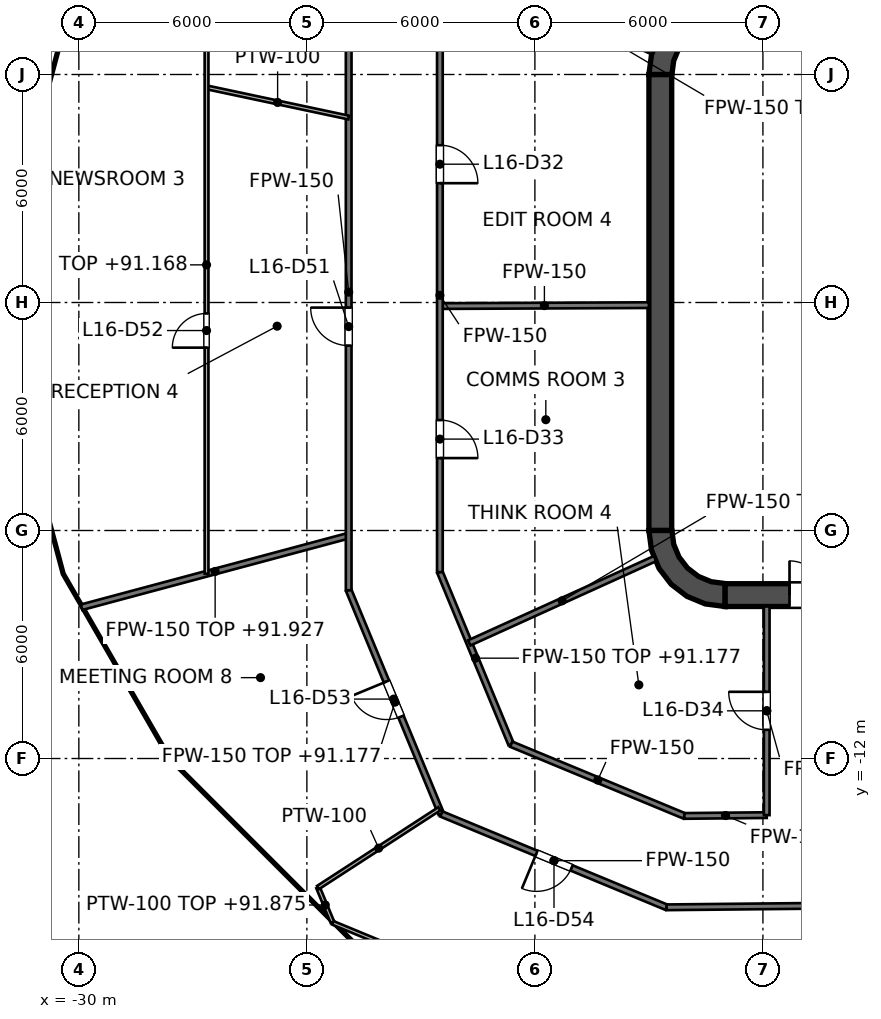
"""IFC4 building model, lengths in metres.
Left out: names, types, materials, properties, quantities, classifications, styles, units other than length and angle.
Written with IfcOpenShell. Run it as: python <this file> out.ifc"""

import sys

from ifc_helpers import new_model, si_unit, direction, frame, frame_2d, origin, place, context, subcontext, project, spatial, polyline, rectangle, outline, extrude, element, fill, save


model = new_model("IFC4")
c1 = context("Model", 3, precision=1e-05, world=origin(), true_north=direction((0.0, 1.0)))
c2 = subcontext(c1, "Body", "Model", "MODEL_VIEW")
j1 = project(units=[si_unit("LENGTHUNIT", "METRE"), si_unit("PLANEANGLEUNIT", "RADIAN")], contexts=[c1])
p1 = place(None, origin())
s1 = spatial("IfcSite", under=j1, at=p1, CompositionType="ELEMENT")
p2 = place(p1, origin())
s2 = spatial("IfcBuilding", under=s1, at=p2, CompositionType="ELEMENT")
p3 = place(p2, frame((0.0, 0.0, 88.2)))
s3 = spatial("IfcBuildingStorey", under=s2, at=p3, CompositionType="ELEMENT", Elevation=88.2)
p4 = place(p3, frame((-13.0, -7.7, 0.0), z_axis=(0.0, 0.0, 1.0), x_axis=(1.0, 0.0, 0.0)))
e1 = element("IfcWall", 1, at=p4, inside=s3, PredefinedType="SHEAR", context=c2, shape_type="SweptSolid", body=[
    extrude(rectangle(XDim=26.0, YDim=0.6, at=frame_2d((13.0, 0.0))), origin(), (0.0, 0.0, 1.0), 4.2),
])
p5 = place(p4, frame((1.7, 0.0, 0.0)))
e2 = element("IfcOpeningElement", 2, at=p5, cuts=e1, PredefinedType="OPENING", context=c2, shape_type="SweptSolid", body=[
    extrude(rectangle(XDim=1.8, YDim=2.1, at=frame_2d((0.9, 1.05))), frame((0.0, 0.3, 0.0), z_axis=(0.0, -1.0, 0.0), x_axis=(1.0, 0.0, 0.0)), (0.0, 0.0, 1.0), 0.6),
])
p6 = place(p4, frame((22.5, 0.0, 0.0)))
e3 = element("IfcOpeningElement", 3, at=p6, cuts=e1, PredefinedType="OPENING", context=c2, shape_type="SweptSolid", body=[
    extrude(rectangle(XDim=1.8, YDim=2.1, at=frame_2d((0.9, 1.05))), frame((0.0, 0.3, 0.0), z_axis=(0.0, -1.0, 0.0), x_axis=(1.0, 0.0, 0.0)), (0.0, 0.0, 1.0), 0.6),
])
p7 = place(p3, frame((-14.7, -6.0, 0.0), z_axis=(0.0, 0.0, 1.0), x_axis=(0.0, 1.0, 0.0)))
e4 = element("IfcWall", 4, at=p7, inside=s3, PredefinedType="SHEAR", context=c2, shape_type="SweptSolid", body=[
    extrude(rectangle(XDim=12.0, YDim=0.6, at=frame_2d((6.0, 0.0))), origin(), (0.0, 0.0, 1.0), 4.2),
])
p8 = place(p3, origin())
e5 = element("IfcWall", 5, at=p8, inside=s3, PredefinedType="SHEAR", context=c2, shape_type="SweptSolid", body=[
    extrude(outline(polyline([(-15.0, 6.0), (-14.395, 6.0), (-14.347, 6.361), (-14.208, 6.698), (-13.986, 6.986), (-13.698, 7.208), (-13.361, 7.347), (-13.0, 7.395), (-13.0, 8.0), (-13.518, 7.932), (-14.0, 7.732), (-14.414, 7.414), (-14.732, 7.0), (-14.932, 6.518), (-15.0, 6.0)])), origin(), (0.0, 0.0, 1.0), 4.2),
])
e6 = element("IfcWall", 6, at=p8, inside=s3, PredefinedType="SHEAR", context=c2, shape_type="SweptSolid", body=[
    extrude(outline(polyline([(-13.0, -8.0), (-13.0, -7.395), (-13.361, -7.347), (-13.698, -7.208), (-13.986, -6.986), (-14.208, -6.698), (-14.347, -6.361), (-14.395, -6.0), (-15.0, -6.0), (-14.932, -6.518), (-14.732, -7.0), (-14.414, -7.414), (-14.0, -7.732), (-13.518, -7.932), (-13.0, -8.0)])), origin(), (0.0, 0.0, 1.0), 4.2),
])
p9 = place(p3, frame((-11.8, -7.4, 0.0), z_axis=(0.0, 0.0, 1.0), x_axis=(0.0, 1.0, 0.0)))
e7 = element("IfcWall", 7, at=p9, inside=s3, PredefinedType="SOLIDWALL", context=c2, shape_type="SweptSolid", body=[
    extrude(rectangle(XDim=14.8, YDim=0.4, at=frame_2d((7.4, 0.0))), origin(), (0.0, 0.0, 1.0), 4.05),
])
p10 = place(p9, frame((11.2, 0.0, 0.0)))
e8 = element("IfcOpeningElement", 8, at=p10, cuts=e7, PredefinedType="OPENING", context=c2, shape_type="SweptSolid", body=[
    extrude(rectangle(XDim=1.1, YDim=2.1, at=frame_2d((0.55, 1.05))), frame((0.0, 0.2, 0.0), z_axis=(0.0, -1.0, 0.0), x_axis=(1.0, 0.0, 0.0)), (0.0, 0.0, 1.0), 0.4),
])
p11 = place(p9, frame((8.3, 0.0, 0.0)))
e9 = element("IfcOpeningElement", 9, at=p11, cuts=e7, PredefinedType="OPENING", context=c2, shape_type="SweptSolid", body=[
    extrude(rectangle(XDim=1.1, YDim=2.1, at=frame_2d((0.55, 1.05))), frame((0.0, 0.2, 0.0), z_axis=(0.0, -1.0, 0.0), x_axis=(1.0, 0.0, 0.0)), (0.0, 0.0, 1.0), 0.4),
])
p12 = place(p9, frame((5.4, 0.0, 0.0)))
e10 = element("IfcOpeningElement", 10, at=p12, cuts=e7, PredefinedType="OPENING", context=c2, shape_type="SweptSolid", body=[
    extrude(rectangle(XDim=1.1, YDim=2.1, at=frame_2d((0.55, 1.05))), frame((0.0, 0.2, 0.0), z_axis=(0.0, -1.0, 0.0), x_axis=(1.0, 0.0, 0.0)), (0.0, 0.0, 1.0), 0.4),
])
p13 = place(p9, frame((13.552, 0.0, 0.0)))
e11 = element("IfcOpeningElement", 11, at=p13, cuts=e7, PredefinedType="OPENING", context=c2, shape_type="SweptSolid", body=[
    extrude(rectangle(XDim=0.9, YDim=2.1, at=frame_2d((0.45, 1.05))), frame((0.0, 0.2, 0.0), z_axis=(0.0, -1.0, 0.0), x_axis=(1.0, 0.0, 0.0)), (0.0, 0.0, 1.0), 0.4),
])
p14 = place(p9, frame((0.347, 0.0, 0.0)))
e12 = element("IfcOpeningElement", 12, at=p14, cuts=e7, PredefinedType="OPENING", context=c2, shape_type="SweptSolid", body=[
    extrude(rectangle(XDim=0.9, YDim=2.1, at=frame_2d((0.45, 1.05))), frame((0.0, 0.2, 0.0), z_axis=(0.0, -1.0, 0.0), x_axis=(1.0, 0.0, 0.0)), (0.0, 0.0, 1.0), 0.4),
])
e13 = element("IfcWall", 13, at=p8, inside=s3, PredefinedType="SOLIDWALL", context=c2, shape_type="SweptSolid", body=[
    extrude(outline(polyline([(-12.0, -5.925), (-12.0, -5.675), (-14.15, -5.675), (-14.15, -3.025), (-12.0, -3.025), (-12.0, -2.775), (-14.15, -2.775), (-14.15, -0.125), (-12.0, -0.125), (-12.0, 0.125), (-14.15, 0.125), (-14.15, 2.775), (-12.0, 2.775), (-12.0, 3.025), (-14.15, 3.025), (-14.15, 5.675), (-12.0, 5.675), (-12.0, 5.925), (-14.15, 5.925), (-14.4, 5.925), (-14.4, 5.675), (-14.4, 3.025), (-14.4, 2.775), (-14.4, 0.125), (-14.4, -0.125), (-14.4, -2.775), (-14.4, -3.025), (-14.4, -5.675), (-14.4, -5.925), (-14.15, -5.925), (-12.0, -5.925)])), origin(), (0.0, 0.0, 1.0), 4.05),
])
p15 = place(p3, frame((-22.9, -7.572, 0.0), z_axis=(0.0, 0.0, 1.0), x_axis=(0.382367581622, -0.924010298928, 0.0)))
e14 = element("IfcWall", 14, at=p15, inside=s3, PredefinedType="PARTITIONING", context=c2, shape_type="SweptSolid", body=[
    extrude(rectangle(XDim=6.374, YDim=0.15, at=frame_2d((3.187, 0.0))), origin(), (0.0, 0.0, 1.0), 2.977),
])
p16 = place(p15, frame((2.6, 0.0, 0.0)))
e15 = element("IfcOpeningElement", 15, at=p16, cuts=e14, PredefinedType="OPENING", context=c2, shape_type="SweptSolid", body=[
    extrude(rectangle(XDim=1.0, YDim=2.1, at=frame_2d((0.5, 1.05))), frame((0.0, 0.075, 0.0), z_axis=(0.0, -1.0, 0.0), x_axis=(1.0, 0.0, 0.0)), (0.0, 0.0, 1.0), 0.15),
])
p17 = place(p3, frame((-20.5, -7.095, 0.0), z_axis=(0.0, 0.0, 1.0), x_axis=(0.382364990163, -0.924011371303, 0.0)))
e16 = element("IfcWall", 16, at=p17, inside=s3, PredefinedType="PARTITIONING", context=c2, shape_type="SweptSolid", body=[
    extrude(rectangle(XDim=4.902, YDim=0.15, at=frame_2d((2.451, 0.0))), origin(), (0.0, 0.0, 1.0), 2.977),
])
p18 = place(p3, frame((-19.76, 8.755, 0.0), z_axis=(0.0, 0.0, 1.0), x_axis=(0.91424834547, -0.405154245695, 0.0)))
e17 = element("IfcWall", 17, at=p18, inside=s3, PredefinedType="PARTITIONING", context=c2, shape_type="SweptSolid", body=[
    extrude(rectangle(XDim=5.318, YDim=0.15, at=frame_2d((2.659, 0.0))), origin(), (0.0, 0.0, 1.0), 2.977),
])
p19 = place(p3, frame((-20.46, -13.46, 0.0), z_axis=(0.0, 0.0, 1.0), x_axis=(0.923801547606, -0.382871650349, 0.0)))
e18 = element("IfcWall", 18, at=p19, inside=s3, PredefinedType="PARTITIONING", context=c2, shape_type="SweptSolid", body=[
    extrude(rectangle(XDim=6.415, YDim=0.15, at=frame_2d((3.208, 0.0))), origin(), (0.0, 0.0, 1.0), 2.968),
])
p20 = place(p19, frame((2.707, 0.0, 0.0)))
e19 = element("IfcOpeningElement", 19, at=p20, cuts=e18, PredefinedType="OPENING", context=c2, shape_type="SweptSolid", body=[
    extrude(rectangle(XDim=1.0, YDim=2.1, at=frame_2d((0.5, 1.05))), frame((0.0, 0.075, 0.0), z_axis=(0.0, -1.0, 0.0), x_axis=(1.0, 0.0, 0.0)), (0.0, 0.0, 1.0), 0.15),
])
p21 = place(p3, frame((-18.623, -11.623, 0.0), z_axis=(0.0, 0.0, 1.0), x_axis=(0.923791670587, -0.38289548098, 0.0)))
e20 = element("IfcWall", 20, at=p21, inside=s3, PredefinedType="PARTITIONING", context=c2, shape_type="SweptSolid", body=[
    extrude(rectangle(XDim=4.931, YDim=0.15, at=frame_2d((2.465, 0.0))), origin(), (0.0, 0.0, 1.0), 2.968),
])
p22 = place(p3, frame((-20.5, -0.094, 0.0), z_axis=(0.0, 0.0, 1.0), x_axis=(0.999990148138, 0.004438876723, 0.0)))
e21 = element("IfcWall", 21, at=p22, inside=s3, PredefinedType="PARTITIONING", context=c2, shape_type="SweptSolid", body=[
    extrude(rectangle(XDim=5.5, YDim=0.15, at=frame_2d((2.75, 0.0))), origin(), (0.0, 0.0, 1.0), 2.968),
])
p23 = place(p3, frame((-14.534, -15.916, 0.0), z_axis=(0.0, 0.0, 1.0), x_axis=(0.999950930262, 0.009906415532, 0.0)))
e22 = element("IfcWall", 22, at=p23, inside=s3, PredefinedType="PARTITIONING", context=c2, shape_type="SweptSolid", body=[
    extrude(rectangle(XDim=33.123, YDim=0.15, at=frame_2d((16.561, 0.0))), origin(), (0.0, 0.0, 1.0), 2.968),
])
p24 = place(p23, frame((22.477, 0.0, 0.0)))
e23 = element("IfcOpeningElement", 23, at=p24, cuts=e22, PredefinedType="OPENING", context=c2, shape_type="SweptSolid", body=[
    extrude(rectangle(XDim=1.0, YDim=2.1, at=frame_2d((0.5, 1.05))), frame((0.0, 0.075, 0.0), z_axis=(0.0, -1.0, 0.0), x_axis=(1.0, 0.0, 0.0)), (0.0, 0.0, 1.0), 0.15),
])
p25 = place(p23, frame((7.723, 0.0, 0.0)))
e24 = element("IfcOpeningElement", 24, at=p25, cuts=e22, PredefinedType="OPENING", context=c2, shape_type="SweptSolid", body=[
    extrude(rectangle(XDim=1.0, YDim=2.1, at=frame_2d((0.5, 1.05))), frame((0.0, 0.075, 0.0), z_axis=(0.0, -1.0, 0.0), x_axis=(1.0, 0.0, 0.0)), (0.0, 0.0, 1.0), 0.15),
])
p26 = place(p23, frame((16.111, 0.0, 0.0)))
e25 = element("IfcOpeningElement", 25, at=p26, cuts=e22, PredefinedType="OPENING", context=c2, shape_type="SweptSolid", body=[
    extrude(rectangle(XDim=1.0, YDim=2.1, at=frame_2d((0.5, 1.05))), frame((0.0, 0.075, 0.0), z_axis=(0.0, -1.0, 0.0), x_axis=(1.0, 0.0, 0.0)), (0.0, 0.0, 1.0), 0.15),
])
p27 = place(p3, frame((-14.068, -13.511, 0.0), z_axis=(0.0, 0.0, 1.0), x_axis=(0.999950911515, 0.009908307647, 0.0)))
e26 = element("IfcWall", 26, at=p27, inside=s3, PredefinedType="PARTITIONING", context=c2, shape_type="SweptSolid", body=[
    extrude(rectangle(XDim=2.168, YDim=0.15, at=frame_2d((1.084, 0.0))), origin(), (0.0, 0.0, 1.0), 2.968),
])
p28 = place(p3, frame((-29.928, -8.019, 0.0), z_axis=(0.0, 0.0, 1.0), x_axis=(0.965929629594, 0.258804850559, 0.0)))
e27 = element("IfcWall", 27, at=p28, inside=s3, PredefinedType="PARTITIONING", context=c2, shape_type="SweptSolid", body=[
    extrude(rectangle(XDim=7.276, YDim=0.15, at=frame_2d((3.638, 0.0))), origin(), (0.0, 0.0, 1.0), 3.727),
])
p29 = place(p3, frame((-19.728, -8.958, 0.0), z_axis=(0.0, 0.0, 1.0), x_axis=(0.910629511797, 0.413223779863, 0.0)))
e28 = element("IfcWall", 28, at=p29, inside=s3, PredefinedType="PARTITIONING", context=c2, shape_type="SweptSolid", body=[
    extrude(rectangle(XDim=5.368, YDim=0.15, at=frame_2d((2.684, 0.0))), origin(), (0.0, 0.0, 1.0), 3.9),
])
p30 = place(p3, frame((-12.629, -21.874, 0.0), z_axis=(0.0, 0.0, 1.0), x_axis=(0.499986326517, 0.86603329803, 0.0)))
e29 = element("IfcWall", 29, at=p30, inside=s3, PredefinedType="PARTITIONING", context=c2, shape_type="SweptSolid", body=[
    extrude(rectangle(XDim=6.941, YDim=0.15, at=frame_2d((3.471, 0.0))), origin(), (0.0, 0.0, 1.0), 3.502),
])
p31 = place(p3, frame((-11.9, -13.49, 0.0), z_axis=(0.0, 0.0, 1.0), x_axis=(0.0, 1.0, 0.0)))
e30 = element("IfcWall", 30, at=p31, inside=s3, PredefinedType="PARTITIONING", context=c2, shape_type="SweptSolid", body=[
    extrude(rectangle(XDim=5.49, YDim=0.15, at=frame_2d((2.745, 0.0))), origin(), (0.0, 0.0, 1.0), 2.968),
])
p32 = place(p31, frame((2.245, 0.0, 0.0)))
e31 = element("IfcOpeningElement", 31, at=p32, cuts=e30, PredefinedType="OPENING", context=c2, shape_type="SweptSolid", body=[
    extrude(rectangle(XDim=1.0, YDim=2.1, at=frame_2d((0.5, 1.05))), frame((0.0, 0.075, 0.0), z_axis=(0.0, -1.0, 0.0), x_axis=(1.0, 0.0, 0.0)), (0.0, 0.0, 1.0), 0.15),
])
p33 = place(p3, frame((-20.5, -7.095, 0.0), z_axis=(0.0, 0.0, 1.0), x_axis=(0.0, 1.0, 0.0)))
e32 = element("IfcWall", 32, at=p33, inside=s3, PredefinedType="PARTITIONING", context=c2, shape_type="SweptSolid", body=[
    extrude(rectangle(XDim=14.569, YDim=0.15, at=frame_2d((7.285, 0.0))), origin(), (0.0, 0.0, 1.0), 2.968),
])
p34 = place(p33, frame((10.234, 0.0, 0.0)))
e33 = element("IfcOpeningElement", 33, at=p34, cuts=e32, PredefinedType="OPENING", context=c2, shape_type="SweptSolid", body=[
    extrude(rectangle(XDim=1.0, YDim=2.1, at=frame_2d((0.5, 1.05))), frame((0.0, 0.075, 0.0), z_axis=(0.0, -1.0, 0.0), x_axis=(1.0, 0.0, 0.0)), (0.0, 0.0, 1.0), 0.15),
])
p35 = place(p33, frame((3.0, 0.0, 0.0)))
e34 = element("IfcOpeningElement", 34, at=p35, cuts=e32, PredefinedType="OPENING", context=c2, shape_type="SweptSolid", body=[
    extrude(rectangle(XDim=1.0, YDim=2.1, at=frame_2d((0.5, 1.05))), frame((0.0, 0.075, 0.0), z_axis=(0.0, -1.0, 0.0), x_axis=(1.0, 0.0, 0.0)), (0.0, 0.0, 1.0), 0.15),
])
p36 = place(p3, frame((-22.9, -7.572, 0.0), z_axis=(0.0, 0.0, 1.0), x_axis=(0.0, 1.0, 0.0)))
e35 = element("IfcWall", 35, at=p36, inside=s3, PredefinedType="PARTITIONING", context=c2, shape_type="SweptSolid", body=[
    extrude(rectangle(XDim=15.689, YDim=0.15, at=frame_2d((7.844, 0.0))), origin(), (0.0, 0.0, 1.0), 2.968),
])
p37 = place(p36, frame((6.438, 0.0, 0.0)))
e36 = element("IfcOpeningElement", 36, at=p37, cuts=e35, PredefinedType="OPENING", context=c2, shape_type="SweptSolid", body=[
    extrude(rectangle(XDim=1.0, YDim=2.1, at=frame_2d((0.5, 1.05))), frame((0.0, 0.075, 0.0), z_axis=(0.0, -1.0, 0.0), x_axis=(1.0, 0.0, 0.0)), (0.0, 0.0, 1.0), 0.15),
])
p38 = place(p3, frame((-23.706, -15.395, 0.0), z_axis=(0.0, 0.0, 1.0), x_axis=(0.382734348683, -0.923858440638, 0.0)))
e37 = element("IfcWall", 37, at=p38, inside=s3, PredefinedType="PARTITIONING", context=c2, shape_type="SweptSolid", body=[
    extrude(rectangle(XDim=0.996, YDim=0.1, at=frame_2d((0.498, 0.0))), origin(), (0.0, 0.0, 1.0), 3.675),
])
p39 = place(p3, frame((-23.315, -16.325, 0.0), z_axis=(0.0, 0.0, 1.0), x_axis=(0.923811686722, -0.382847185541, 0.0)))
e38 = element("IfcWall", 38, at=p39, inside=s3, PredefinedType="PARTITIONING", context=c2, shape_type="SweptSolid", body=[
    extrude(rectangle(XDim=8.719, YDim=0.1, at=frame_2d((4.36, 0.0))), origin(), (0.0, 0.0, 1.0), 2.968),
])
p40 = place(p3, frame((-26.64, 5.662, 0.0), z_axis=(0.0, 0.0, 1.0), x_axis=(0.978136613381, -0.207963375533, 0.0)))
e39 = element("IfcWall", 39, at=p40, inside=s3, PredefinedType="PARTITIONING", context=c2, shape_type="SweptSolid", body=[
    extrude(rectangle(XDim=3.823, YDim=0.1, at=frame_2d((1.912, 0.0))), origin(), (0.0, 0.0, 1.0), 3.9),
])
p41 = place(p3, frame((-23.706, -15.395, 0.0), z_axis=(0.0, 0.0, 1.0), x_axis=(0.838733884708, 0.544541523341, 0.0)))
e40 = element("IfcWall", 40, at=p41, inside=s3, PredefinedType="PARTITIONING", context=c2, shape_type="SweptSolid", body=[
    extrude(rectangle(XDim=3.803, YDim=0.1, at=frame_2d((1.902, 0.0))), origin(), (0.0, 0.0, 1.0), 3.9),
])
p42 = place(p3, frame((-26.64, -7.138, 0.0), z_axis=(0.0, 0.0, 1.0), x_axis=(0.0, 1.0, 0.0)))
e41 = element("IfcWall", 41, at=p42, inside=s3, PredefinedType="PARTITIONING", context=c2, shape_type="SweptSolid", body=[
    extrude(rectangle(XDim=16.257, YDim=0.1, at=frame_2d((8.128, 0.0))), origin(), (0.0, 0.0, 1.0), 2.968),
])
p43 = place(p42, frame((5.95, 0.0, 0.0)))
e42 = element("IfcOpeningElement", 42, at=p43, cuts=e41, PredefinedType="OPENING", context=c2, shape_type="SweptSolid", body=[
    extrude(rectangle(XDim=0.9, YDim=2.1, at=frame_2d((0.45, 1.05))), frame((0.0, 0.05, 0.0), z_axis=(0.0, -1.0, 0.0), x_axis=(1.0, 0.0, 0.0)), (0.0, 0.0, 1.0), 0.1),
])
p44 = place(p10, origin())
e43 = element("IfcDoor", 43, at=p44, inside=s3, OperationType="DOUBLE_DOOR_SLIDING", PredefinedType="DOOR", context=c2, shape_type="SweptSolid", body=[
    extrude(rectangle(XDim=1.1, YDim=2.1, at=frame_2d((0.55, 1.05))), frame((0.0, 0.025, 0.0), z_axis=(0.0, -1.0, 0.0), x_axis=(1.0, 0.0, 0.0)), (0.0, 0.0, 1.0), 0.05),
])
fill(e8, e43)
p45 = place(p11, origin())
e44 = element("IfcDoor", 44, at=p45, inside=s3, OperationType="DOUBLE_DOOR_SLIDING", PredefinedType="DOOR", context=c2, shape_type="SweptSolid", body=[
    extrude(rectangle(XDim=1.1, YDim=2.1, at=frame_2d((0.55, 1.05))), frame((0.0, 0.025, 0.0), z_axis=(0.0, -1.0, 0.0), x_axis=(1.0, 0.0, 0.0)), (0.0, 0.0, 1.0), 0.05),
])
fill(e9, e44)
p46 = place(p12, origin())
e45 = element("IfcDoor", 45, at=p46, inside=s3, OperationType="DOUBLE_DOOR_SLIDING", PredefinedType="DOOR", context=c2, shape_type="SweptSolid", body=[
    extrude(rectangle(XDim=1.1, YDim=2.1, at=frame_2d((0.55, 1.05))), frame((0.0, 0.025, 0.0), z_axis=(0.0, -1.0, 0.0), x_axis=(1.0, 0.0, 0.0)), (0.0, 0.0, 1.0), 0.05),
])
fill(e10, e45)
p47 = place(p13, origin())
e46 = element("IfcDoor", 46, at=p47, inside=s3, OperationType="SINGLE_SWING_LEFT", PredefinedType="DOOR", context=c2, shape_type="SweptSolid", body=[
    extrude(rectangle(XDim=0.9, YDim=2.1, at=frame_2d((0.45, 1.05))), frame((0.0, 0.025, 0.0), z_axis=(0.0, -1.0, 0.0), x_axis=(1.0, 0.0, 0.0)), (0.0, 0.0, 1.0), 0.05),
])
fill(e11, e46)
p48 = place(p14, origin())
e47 = element("IfcDoor", 47, at=p48, inside=s3, OperationType="SINGLE_SWING_LEFT", PredefinedType="DOOR", context=c2, shape_type="SweptSolid", body=[
    extrude(rectangle(XDim=0.9, YDim=2.1, at=frame_2d((0.45, 1.05))), frame((0.0, 0.025, 0.0), z_axis=(0.0, -1.0, 0.0), x_axis=(1.0, 0.0, 0.0)), (0.0, 0.0, 1.0), 0.05),
])
fill(e12, e47)
p49 = place(p5, origin())
e48 = element("IfcDoor", 48, at=p49, inside=s3, OperationType="DOUBLE_DOOR_SINGLE_SWING", PredefinedType="DOOR", context=c2, shape_type="SweptSolid", body=[
    extrude(rectangle(XDim=1.8, YDim=2.1, at=frame_2d((0.9, 1.05))), frame((0.0, 0.025, 0.0), z_axis=(0.0, -1.0, 0.0), x_axis=(1.0, 0.0, 0.0)), (0.0, 0.0, 1.0), 0.05),
])
fill(e2, e48)
p50 = place(p34, origin())
e49 = element("IfcDoor", 49, at=p50, inside=s3, OperationType="SINGLE_SWING_LEFT", PredefinedType="DOOR", context=c2, shape_type="SweptSolid", body=[
    extrude(rectangle(XDim=1.0, YDim=2.1, at=frame_2d((0.5, 1.05))), frame((0.0, 0.025, 0.0), z_axis=(0.0, -1.0, 0.0), x_axis=(1.0, 0.0, 0.0)), (0.0, 0.0, 1.0), 0.05),
])
fill(e33, e49)
p51 = place(p35, origin())
e50 = element("IfcDoor", 50, at=p51, inside=s3, OperationType="SINGLE_SWING_LEFT", PredefinedType="DOOR", context=c2, shape_type="SweptSolid", body=[
    extrude(rectangle(XDim=1.0, YDim=2.1, at=frame_2d((0.5, 1.05))), frame((0.0, 0.025, 0.0), z_axis=(0.0, -1.0, 0.0), x_axis=(1.0, 0.0, 0.0)), (0.0, 0.0, 1.0), 0.05),
])
fill(e34, e50)
p52 = place(p32, origin())
e51 = element("IfcDoor", 51, at=p52, inside=s3, OperationType="SINGLE_SWING_RIGHT", PredefinedType="DOOR", context=c2, shape_type="SweptSolid", body=[
    extrude(rectangle(XDim=1.0, YDim=2.1, at=frame_2d((0.5, 1.05))), frame((0.0, 0.025, 0.0), z_axis=(0.0, -1.0, 0.0), x_axis=(1.0, 0.0, 0.0)), (0.0, 0.0, 1.0), 0.05),
])
fill(e31, e51)
p53 = place(p37, origin())
e52 = element("IfcDoor", 52, at=p53, inside=s3, OperationType="SINGLE_SWING_RIGHT", PredefinedType="DOOR", context=c2, shape_type="SweptSolid", body=[
    extrude(rectangle(XDim=1.0, YDim=2.1, at=frame_2d((0.5, 1.05))), frame((0.0, 0.025, 0.0), z_axis=(0.0, -1.0, 0.0), x_axis=(1.0, 0.0, 0.0)), (0.0, 0.0, 1.0), 0.05),
])
fill(e36, e52)
p54 = place(p43, origin())
e53 = element("IfcDoor", 53, at=p54, inside=s3, OperationType="SINGLE_SWING_LEFT", PredefinedType="DOOR", context=c2, shape_type="SweptSolid", body=[
    extrude(rectangle(XDim=0.9, YDim=2.1, at=frame_2d((0.45, 1.05))), frame((0.0, 0.025, 0.0), z_axis=(0.0, -1.0, 0.0), x_axis=(1.0, 0.0, 0.0)), (0.0, 0.0, 1.0), 0.05),
])
fill(e42, e53)
p55 = place(p16, origin())
e54 = element("IfcDoor", 54, at=p55, inside=s3, OperationType="SINGLE_SWING_LEFT", PredefinedType="DOOR", context=c2, shape_type="SweptSolid", body=[
    extrude(rectangle(XDim=1.0, YDim=2.1, at=frame_2d((0.5, 1.05))), frame((0.0, 0.025, 0.0), z_axis=(0.0, -1.0, 0.0), x_axis=(1.0, 0.0, 0.0)), (0.0, 0.0, 1.0), 0.05),
])
fill(e15, e54)
p56 = place(p20, origin())
e55 = element("IfcDoor", 55, at=p56, inside=s3, OperationType="SINGLE_SWING_LEFT", PredefinedType="DOOR", context=c2, shape_type="SweptSolid", body=[
    extrude(rectangle(XDim=1.0, YDim=2.1, at=frame_2d((0.5, 1.05))), frame((0.0, 0.025, 0.0), z_axis=(0.0, -1.0, 0.0), x_axis=(1.0, 0.0, 0.0)), (0.0, 0.0, 1.0), 0.05),
])
fill(e19, e55)
save(model, sys.argv[1])
